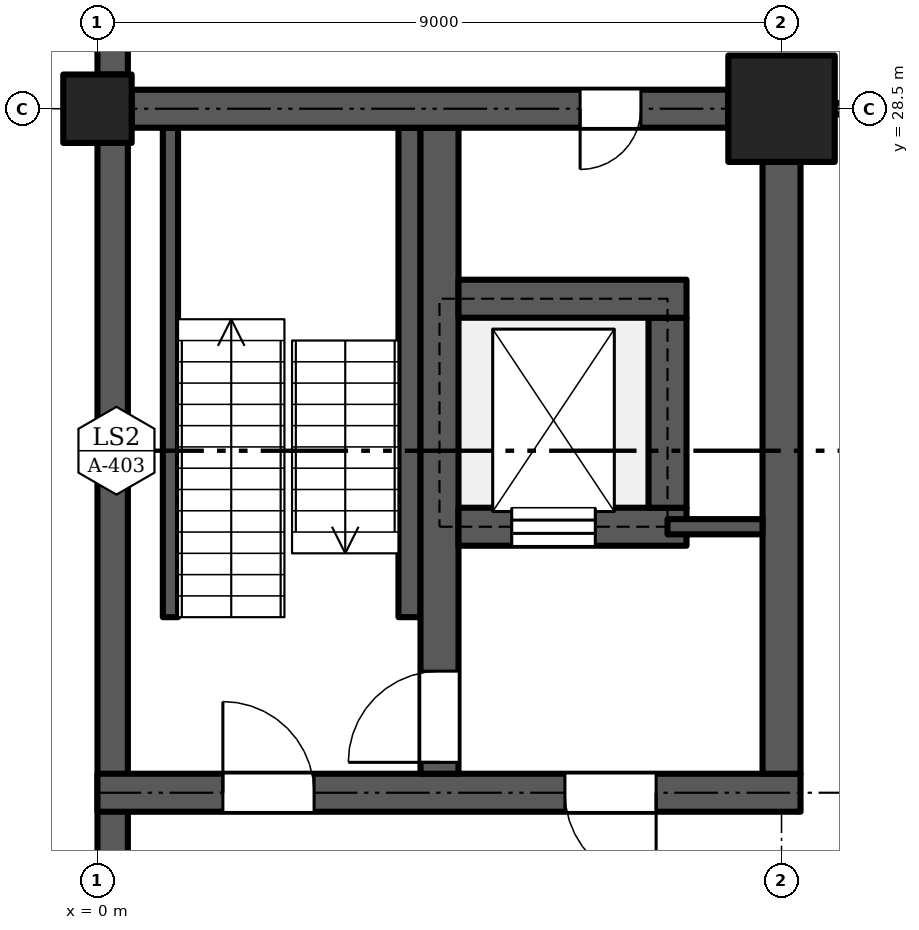
"""IFC4 building model, lengths in metres.
Left out: names, types, materials, properties, quantities, classifications, styles, units other than length and angle.
Written with IfcOpenShell. Run it as: python <this file> out.ifc"""

import sys

from ifc_helpers import new_model, si_unit, direction, frame, frame_2d, origin, origin_2d, place, context, subcontext, project, spatial, rectangle, extrude, element, fill, save


model = new_model("IFC4")
c1 = context("Model", 3, precision=1e-05, world=origin(), true_north=direction((0.0, 1.0)))
c2 = subcontext(c1, "Body", "Model", "MODEL_VIEW")
j1 = project(units=[si_unit("LENGTHUNIT", "METRE"), si_unit("PLANEANGLEUNIT", "RADIAN")], contexts=[c1])
p1 = place(None, origin())
s1 = spatial("IfcSite", under=j1, at=p1, CompositionType="ELEMENT")
p2 = place(p1, origin())
s2 = spatial("IfcBuilding", under=s1, at=p2, CompositionType="ELEMENT")
p3 = place(p2, frame((0.0, 0.0, -8.4)))
s3 = spatial("IfcBuildingStorey", under=s2, at=p3, CompositionType="ELEMENT", Elevation=-8.4)
p4 = place(p3, frame((0.0, 28.5, 0.0), z_axis=(0.0, 0.0, 1.0), x_axis=(1.0, 0.0, 0.0)))
e1 = element("IfcColumn", 1, at=p4, inside=s3, PredefinedType="COLUMN", context=c2, shape_type="SweptSolid", body=[
    extrude(rectangle(XDim=0.9, YDim=0.9, at=origin_2d()), origin(), (0.0, 0.0, 1.0), 4.2),
])
p5 = place(p3, frame((9.0, 28.5, 0.0), z_axis=(0.0, 0.0, 1.0), x_axis=(1.0, 0.0, 0.0)))
e2 = element("IfcColumn", 2, at=p5, inside=s3, PredefinedType="COLUMN", context=c2, shape_type="SweptSolid", body=[
    extrude(rectangle(XDim=1.4, YDim=1.4, at=origin_2d()), origin(), (0.0, 0.0, 1.0), 4.2),
])
p6 = place(p3, frame((0.2, 12.45, 0.0), z_axis=(0.0, 0.0, 1.0), x_axis=(0.0, 1.0, 0.0)))
e3 = element("IfcWall", 3, at=p6, inside=s3, PredefinedType="SOLIDWALL", context=c2, shape_type="SweptSolid", body=[
    extrude(rectangle(XDim=15.6, YDim=0.4, at=frame_2d((7.8, 0.0))), origin(), (0.0, 0.0, 1.0), 3.8),
])
p7 = place(p3, frame((0.0, 19.5, 0.0), z_axis=(0.0, 0.0, 1.0), x_axis=(1.0, 0.0, 0.0)))
e4 = element("IfcWall", 4, at=p7, inside=s3, PredefinedType="SHEAR", context=c2, shape_type="SweptSolid", body=[
    extrude(rectangle(XDim=9.25, YDim=0.5, at=frame_2d((4.625, 0.0))), origin(), (0.0, 0.0, 1.0), 3.8),
])
p8 = place(p7, frame((1.65, 0.0, 0.0)))
e5 = element("IfcOpeningElement", 5, at=p8, cuts=e4, PredefinedType="OPENING", context=c2, shape_type="SweptSolid", body=[
    extrude(rectangle(XDim=1.2, YDim=2.1, at=frame_2d((0.6, 1.05))), frame((0.0, 0.26, 0.0), z_axis=(0.0, -1.0, 0.0), x_axis=(1.0, 0.0, 0.0)), (0.0, 0.0, 1.0), 0.52),
])
p9 = place(p7, frame((7.35, 0.0, 0.0), z_axis=(0.0, 0.0, 1.0), x_axis=(-1.0, 0.0, 0.0)))
e6 = element("IfcOpeningElement", 6, at=p9, cuts=e4, PredefinedType="OPENING", context=c2, shape_type="SweptSolid", body=[
    extrude(rectangle(XDim=1.2, YDim=2.1, at=frame_2d((0.6, 1.05))), frame((0.0, 0.26, 0.0), z_axis=(0.0, -1.0, 0.0), x_axis=(1.0, 0.0, 0.0)), (0.0, 0.0, 1.0), 0.52),
])
p10 = place(p3, frame((4.5, 19.75, 0.0), z_axis=(0.0, 0.0, 1.0), x_axis=(0.0, 1.0, 0.0)))
e7 = element("IfcWall", 7, at=p10, inside=s3, PredefinedType="SHEAR", context=c2, shape_type="SweptSolid", body=[
    extrude(rectangle(XDim=8.5, YDim=0.5, at=frame_2d((4.25, 0.0))), origin(), (0.0, 0.0, 1.0), 3.8),
])
p11 = place(p10, frame((0.15, 0.0, 0.0)))
e8 = element("IfcOpeningElement", 8, at=p11, cuts=e7, PredefinedType="OPENING", context=c2, shape_type="SweptSolid", body=[
    extrude(rectangle(XDim=1.2, YDim=2.1, at=frame_2d((0.6, 1.05))), frame((0.0, 0.26, 0.0), z_axis=(0.0, -1.0, 0.0), x_axis=(1.0, 0.0, 0.0)), (0.0, 0.0, 1.0), 0.52),
])
p12 = place(p3, frame((9.0, 19.75, 0.0), z_axis=(0.0, 0.0, 1.0), x_axis=(0.0, 1.0, 0.0)))
e9 = element("IfcWall", 9, at=p12, inside=s3, PredefinedType="SHEAR", context=c2, shape_type="SweptSolid", body=[
    extrude(rectangle(XDim=8.05, YDim=0.5, at=frame_2d((4.025, 0.0))), origin(), (0.0, 0.0, 1.0), 3.8),
])
p13 = place(p3, frame((4.75, 23.0, 0.0), z_axis=(0.0, 0.0, 1.0), x_axis=(1.0, 0.0, 0.0)))
e10 = element("IfcWall", 10, at=p13, inside=s3, PredefinedType="SHEAR", context=c2, shape_type="SweptSolid", body=[
    extrude(rectangle(XDim=3.0, YDim=0.5, at=frame_2d((1.5, 0.0))), origin(), (0.0, 0.0, 1.0), 3.8),
])
p14 = place(p13, frame((0.7, 0.0, 0.0)))
e11 = element("IfcOpeningElement", 11, at=p14, cuts=e10, PredefinedType="OPENING", context=c2, shape_type="SweptSolid", body=[
    extrude(rectangle(XDim=1.1, YDim=2.1, at=frame_2d((0.55, 1.05))), frame((0.0, 0.26, 0.0), z_axis=(0.0, -1.0, 0.0), x_axis=(1.0, 0.0, 0.0)), (0.0, 0.0, 1.0), 0.52),
])
p15 = place(p3, frame((7.5, 23.25, 0.0), z_axis=(0.0, 0.0, 1.0), x_axis=(0.0, 1.0, 0.0)))
e12 = element("IfcWall", 12, at=p15, inside=s3, PredefinedType="SHEAR", context=c2, shape_type="SweptSolid", body=[
    extrude(rectangle(XDim=2.5, YDim=0.5, at=frame_2d((1.25, 0.0))), origin(), (0.0, 0.0, 1.0), 3.8),
])
p16 = place(p3, frame((4.75, 26.0, 0.0), z_axis=(0.0, 0.0, 1.0), x_axis=(1.0, 0.0, 0.0)))
e13 = element("IfcWall", 13, at=p16, inside=s3, PredefinedType="SHEAR", context=c2, shape_type="SweptSolid", body=[
    extrude(rectangle(XDim=3.0, YDim=0.5, at=frame_2d((1.5, 0.0))), origin(), (0.0, 0.0, 1.0), 3.8),
])
p17 = place(p3, frame((0.45, 28.5, 0.0), z_axis=(0.0, 0.0, 1.0), x_axis=(1.0, 0.0, 0.0)))
e14 = element("IfcWall", 14, at=p17, inside=s3, PredefinedType="SHEAR", context=c2, shape_type="SweptSolid", body=[
    extrude(rectangle(XDim=7.85, YDim=0.5, at=frame_2d((3.925, 0.0))), origin(), (0.0, 0.0, 1.0), 3.8),
])
p18 = place(p17, frame((6.7, 0.0, 0.0), z_axis=(0.0, 0.0, 1.0), x_axis=(-1.0, 0.0, 0.0)))
e15 = element("IfcOpeningElement", 15, at=p18, cuts=e14, PredefinedType="OPENING", context=c2, shape_type="SweptSolid", body=[
    extrude(rectangle(XDim=0.8, YDim=2.0, at=frame_2d((0.4, 1.0))), frame((0.0, 0.26, 0.0), z_axis=(0.0, -1.0, 0.0), x_axis=(1.0, 0.0, 0.0)), (0.0, 0.0, 1.0), 0.52),
])
p19 = place(p3, frame((0.2, 28.95, 0.0), z_axis=(0.0, 0.0, 1.0), x_axis=(0.0, 1.0, 0.0)))
e16 = element("IfcWall", 16, at=p19, inside=s3, PredefinedType="SOLIDWALL", context=c2, shape_type="SweptSolid", body=[
    extrude(rectangle(XDim=8.1, YDim=0.4, at=frame_2d((4.05, 0.0))), origin(), (0.0, 0.0, 1.0), 3.8),
])
p20 = place(p3, frame((7.5, 23.0, 0.0), z_axis=(0.0, 0.0, 1.0), x_axis=(1.0, 0.0, 0.0)))
e17 = element("IfcWall", 17, at=p20, inside=s3, PredefinedType="SHEAR", context=c2, shape_type="SweptSolid", body=[
    extrude(rectangle(XDim=1.25, YDim=0.2, at=frame_2d((0.625, 0.0))), origin(), (0.0, 0.0, 1.0), 3.8),
])
p21 = place(p3, frame((9.7, 28.5, 0.0), z_axis=(0.0, 0.0, 1.0), x_axis=(1.0, 0.0, 0.0)))
e18 = element("IfcWall", 18, at=p21, inside=s3, PredefinedType="PARTITIONING", context=c2, shape_type="SweptSolid", body=[
    extrude(rectangle(XDim=2.3, YDim=0.15, at=frame_2d((1.15, 0.0))), origin(), (0.0, 0.0, 1.0), 3.05),
])
p22 = place(p21, frame((0.2, 0.0, 0.0)))
e19 = element("IfcOpeningElement", 19, at=p22, cuts=e18, PredefinedType="OPENING", context=c2, shape_type="SweptSolid", body=[
    extrude(rectangle(XDim=1.4, YDim=2.1, at=frame_2d((0.7, 1.05))), frame((0.0, 0.085, 0.0), z_axis=(0.0, -1.0, 0.0), x_axis=(1.0, 0.0, 0.0)), (0.0, 0.0, 1.0), 0.17),
])
p23 = place(p3, frame((0.96, 21.81, 0.0), z_axis=(0.0, 0.0, 1.0), x_axis=(0.0, 1.0, 0.0)))
e20 = element("IfcWall", 20, at=p23, inside=s3, PredefinedType="SHEAR", context=c2, shape_type="SweptSolid", body=[
    extrude(rectangle(XDim=6.44, YDim=0.2, at=frame_2d((3.22, 0.0))), origin(), (0.0, 0.0, 1.0), 3.8),
])
p24 = place(p3, frame((4.105, 21.81, 0.0), z_axis=(0.0, 0.0, 1.0), x_axis=(0.0, 1.0, 0.0)))
e21 = element("IfcWall", 21, at=p24, inside=s3, PredefinedType="SHEAR", context=c2, shape_type="SweptSolid", body=[
    extrude(rectangle(XDim=6.44, YDim=0.29, at=frame_2d((3.22, 0.0))), origin(), (0.0, 0.0, 1.0), 3.8),
])
p25 = place(p8, origin())
e22 = element("IfcDoor", 22, at=p25, inside=s3, OperationType="SINGLE_SWING_LEFT", PredefinedType="DOOR", context=c2, shape_type="SweptSolid", body=[
    extrude(rectangle(XDim=1.2, YDim=2.1, at=frame_2d((0.6, 1.05))), frame((0.0, 0.025, 0.0), z_axis=(0.0, -1.0, 0.0), x_axis=(1.0, 0.0, 0.0)), (0.0, 0.0, 1.0), 0.05),
])
fill(e5, e22)
p26 = place(p18, origin())
e23 = element("IfcDoor", 23, at=p26, inside=s3, OperationType="SINGLE_SWING_RIGHT", PredefinedType="DOOR", context=c2, shape_type="SweptSolid", body=[
    extrude(rectangle(XDim=0.8, YDim=2.0, at=frame_2d((0.4, 1.0))), frame((0.0, 0.025, 0.0), z_axis=(0.0, -1.0, 0.0), x_axis=(1.0, 0.0, 0.0)), (0.0, 0.0, 1.0), 0.05),
])
fill(e15, e23)
p27 = place(p9, origin())
e24 = element("IfcDoor", 24, at=p27, inside=s3, OperationType="SINGLE_SWING_LEFT", PredefinedType="DOOR", context=c2, shape_type="SweptSolid", body=[
    extrude(rectangle(XDim=1.2, YDim=2.1, at=frame_2d((0.6, 1.05))), frame((0.0, 0.025, 0.0), z_axis=(0.0, -1.0, 0.0), x_axis=(1.0, 0.0, 0.0)), (0.0, 0.0, 1.0), 0.05),
])
fill(e6, e24)
p28 = place(p11, origin())
e25 = element("IfcDoor", 25, at=p28, inside=s3, OperationType="SINGLE_SWING_LEFT", PredefinedType="DOOR", context=c2, shape_type="SweptSolid", body=[
    extrude(rectangle(XDim=1.2, YDim=2.1, at=frame_2d((0.6, 1.05))), frame((0.0, 0.025, 0.0), z_axis=(0.0, -1.0, 0.0), x_axis=(1.0, 0.0, 0.0)), (0.0, 0.0, 1.0), 0.05),
])
fill(e8, e25)
p29 = place(p14, origin())
e26 = element("IfcDoor", 26, at=p29, inside=s3, OperationType="SLIDING_TO_LEFT", PredefinedType="DOOR", context=c2, shape_type="SweptSolid", body=[
    extrude(rectangle(XDim=1.1, YDim=2.1, at=frame_2d((0.55, 1.05))), frame((0.0, 0.025, 0.0), z_axis=(0.0, -1.0, 0.0), x_axis=(1.0, 0.0, 0.0)), (0.0, 0.0, 1.0), 0.05),
])
fill(e11, e26)
save(model, sys.argv[1])
